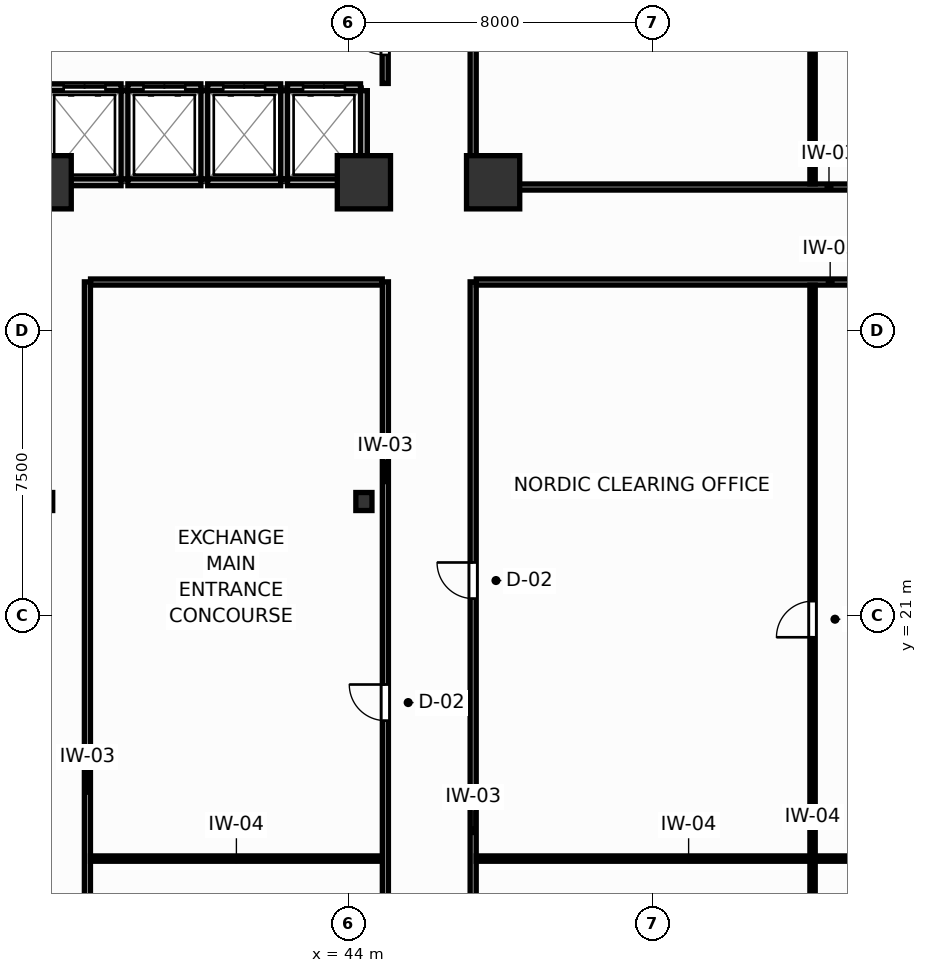
"""IFC4 building model, lengths in metres.
Left out: names, types, materials, properties, quantities, classifications, styles, units other than length and angle.
Written with IfcOpenShell. Run it as: python <this file> out.ifc"""

import sys

from ifc_helpers import new_model, si_unit, direction, frame, frame_2d, origin, origin_2d, place, context, subcontext, project, spatial, rectangle, i_section, extrude, source, transform, mapped, element, fill, save


model = new_model("IFC4")
c1 = context("Model", 3, precision=1e-05, world=origin(), true_north=direction((0.0, 1.0)))
c2 = subcontext(c1, "Body", "Model", "MODEL_VIEW")
j1 = project(units=[si_unit("LENGTHUNIT", "METRE"), si_unit("PLANEANGLEUNIT", "RADIAN")], contexts=[c1])
p1 = place(None, origin())
s1 = spatial("IfcSite", under=j1, at=p1, CompositionType="ELEMENT")
p2 = place(p1, origin())
s2 = spatial("IfcBuilding", under=s1, at=p2, CompositionType="ELEMENT")
p3 = place(p2, origin())
s3 = spatial("IfcBuildingStorey", under=s2, at=p3, CompositionType="ELEMENT", Elevation=0.0)
m1 = source(origin(), c2, "Body", "SweptSolid", [
    extrude(rectangle(XDim=1.4, YDim=1.4, at=origin_2d()), origin(), (0.0, 0.0, 1.0), 4.8),
])
for number, where, z_axis, x_axis in (
    (1, (44.4, 32.4, 0.0), (0.0, 0.0, 1.0), (1.0, 0.0, 0.0)),
    (2, (36.0, 32.4, 0.0), (0.0, 0.0, 1.0), (1.0, 0.0, 0.0)),
    (3, (47.8, 32.4, 0.0), (0.0, 0.0, 1.0), (1.0, 0.0, 0.0)),
):
    element("IfcColumn", number, at=place(p3, frame(where, z_axis=z_axis, x_axis=x_axis)), inside=s3, PredefinedType="COLUMN", context=c2, shape_type="MappedRepresentation", body=[
        mapped(m1, transform((0.0, 0.0, 0.0), scale=1.0)),
    ])
m2 = source(origin(), c2, "Body", "SweptSolid", [
    extrude(i_section(OverallWidth=0.424, OverallDepth=0.474, WebThickness=0.045, FlangeThickness=0.072, FilletRadius=0.015, at=origin_2d()), origin(), (0.0, 0.0, 1.0), 4.8),
])
for number, where, z_axis, x_axis in (
    (4, (44.4, 24.0, 0.0), (0.0, 0.0, 1.0), (1.0, 0.0, 0.0)),
    (5, (36.0, 24.0, 0.0), (0.0, 0.0, 1.0), (1.0, 0.0, 0.0)),
):
    element("IfcColumn", number, at=place(p3, frame(where, z_axis=z_axis, x_axis=x_axis)), inside=s3, PredefinedType="COLUMN", context=c2, shape_type="MappedRepresentation", body=[
        mapped(m2, transform((0.0, 0.0, 0.0), scale=1.0)),
    ])
p4 = place(p3, frame((36.09, 34.9, 0.0), z_axis=(0.0, 0.0, 1.0), x_axis=(1.0, 0.0, 0.0)))
e6 = element("IfcWall", 6, at=p4, inside=s3, PredefinedType="PARTITIONING", context=c2, shape_type="SweptSolid", body=[
    extrude(rectangle(XDim=1.92, YDim=0.18, at=frame_2d((0.96, 0.0))), origin(), (0.0, 0.0, 1.0), 4.52),
])
p5 = place(p4, frame((0.41, 0.0, 0.0)))
e7 = element("IfcOpeningElement", 7, at=p5, cuts=e6, PredefinedType="OPENING", context=c2, shape_type="SweptSolid", body=[
    extrude(rectangle(XDim=1.1, YDim=2.1, at=frame_2d((0.55, 1.05))), frame((0.0, 0.1, 0.0), z_axis=(0.0, -1.0, 0.0), x_axis=(1.0, 0.0, 0.0)), (0.0, 0.0, 1.0), 0.2),
])
p6 = place(p3, frame((36.09, 32.4, 0.0), z_axis=(0.0, 0.0, 1.0), x_axis=(1.0, 0.0, 0.0)))
e8 = element("IfcWall", 8, at=p6, inside=s3, PredefinedType="PARTITIONING", context=c2, shape_type="SweptSolid", body=[
    extrude(rectangle(XDim=1.92, YDim=0.18, at=frame_2d((0.96, 0.0))), origin(), (0.0, 0.0, 1.0), 3.82),
])
p7 = place(p3, frame((38.19, 34.9, 0.0), z_axis=(0.0, 0.0, 1.0), x_axis=(1.0, 0.0, 0.0)))
e9 = element("IfcWall", 9, at=p7, inside=s3, PredefinedType="PARTITIONING", context=c2, shape_type="SweptSolid", body=[
    extrude(rectangle(XDim=1.92, YDim=0.18, at=frame_2d((0.96, 0.0))), origin(), (0.0, 0.0, 1.0), 4.52),
])
p8 = place(p7, frame((0.41, 0.0, 0.0)))
e10 = element("IfcOpeningElement", 10, at=p8, cuts=e9, PredefinedType="OPENING", context=c2, shape_type="SweptSolid", body=[
    extrude(rectangle(XDim=1.1, YDim=2.1, at=frame_2d((0.55, 1.05))), frame((0.0, 0.1, 0.0), z_axis=(0.0, -1.0, 0.0), x_axis=(1.0, 0.0, 0.0)), (0.0, 0.0, 1.0), 0.2),
])
p9 = place(p3, frame((38.19, 32.4, 0.0), z_axis=(0.0, 0.0, 1.0), x_axis=(1.0, 0.0, 0.0)))
e11 = element("IfcWall", 11, at=p9, inside=s3, PredefinedType="PARTITIONING", context=c2, shape_type="SweptSolid", body=[
    extrude(rectangle(XDim=1.92, YDim=0.18, at=frame_2d((0.96, 0.0))), origin(), (0.0, 0.0, 1.0), 3.82),
])
p10 = place(p3, frame((38.1, 32.49, 0.0), z_axis=(0.0, 0.0, 1.0), x_axis=(0.0, 1.0, 0.0)))
e12 = element("IfcWall", 12, at=p10, inside=s3, PredefinedType="PARTITIONING", context=c2, shape_type="SweptSolid", body=[
    extrude(rectangle(XDim=2.32, YDim=0.18, at=frame_2d((1.16, 0.0))), origin(), (0.0, 0.0, 1.0), 4.52),
])
p11 = place(p3, frame((40.29, 34.9, 0.0), z_axis=(0.0, 0.0, 1.0), x_axis=(1.0, 0.0, 0.0)))
e13 = element("IfcWall", 13, at=p11, inside=s3, PredefinedType="PARTITIONING", context=c2, shape_type="SweptSolid", body=[
    extrude(rectangle(XDim=1.92, YDim=0.18, at=frame_2d((0.96, 0.0))), origin(), (0.0, 0.0, 1.0), 4.52),
])
p12 = place(p11, frame((0.41, 0.0, 0.0)))
e14 = element("IfcOpeningElement", 14, at=p12, cuts=e13, PredefinedType="OPENING", context=c2, shape_type="SweptSolid", body=[
    extrude(rectangle(XDim=1.1, YDim=2.1, at=frame_2d((0.55, 1.05))), frame((0.0, 0.1, 0.0), z_axis=(0.0, -1.0, 0.0), x_axis=(1.0, 0.0, 0.0)), (0.0, 0.0, 1.0), 0.2),
])
p13 = place(p3, frame((40.29, 32.4, 0.0), z_axis=(0.0, 0.0, 1.0), x_axis=(1.0, 0.0, 0.0)))
e15 = element("IfcWall", 15, at=p13, inside=s3, PredefinedType="PARTITIONING", context=c2, shape_type="SweptSolid", body=[
    extrude(rectangle(XDim=1.92, YDim=0.18, at=frame_2d((0.96, 0.0))), origin(), (0.0, 0.0, 1.0), 3.82),
])
p14 = place(p3, frame((40.2, 32.49, 0.0), z_axis=(0.0, 0.0, 1.0), x_axis=(0.0, 1.0, 0.0)))
e16 = element("IfcWall", 16, at=p14, inside=s3, PredefinedType="PARTITIONING", context=c2, shape_type="SweptSolid", body=[
    extrude(rectangle(XDim=2.32, YDim=0.18, at=frame_2d((1.16, 0.0))), origin(), (0.0, 0.0, 1.0), 4.52),
])
p15 = place(p3, frame((42.39, 34.9, 0.0), z_axis=(0.0, 0.0, 1.0), x_axis=(1.0, 0.0, 0.0)))
e17 = element("IfcWall", 17, at=p15, inside=s3, PredefinedType="PARTITIONING", context=c2, shape_type="SweptSolid", body=[
    extrude(rectangle(XDim=1.92, YDim=0.18, at=frame_2d((0.96, 0.0))), origin(), (0.0, 0.0, 1.0), 4.52),
])
p16 = place(p15, frame((0.41, 0.0, 0.0)))
e18 = element("IfcOpeningElement", 18, at=p16, cuts=e17, PredefinedType="OPENING", context=c2, shape_type="SweptSolid", body=[
    extrude(rectangle(XDim=1.1, YDim=2.1, at=frame_2d((0.55, 1.05))), frame((0.0, 0.1, 0.0), z_axis=(0.0, -1.0, 0.0), x_axis=(1.0, 0.0, 0.0)), (0.0, 0.0, 1.0), 0.2),
])
p17 = place(p3, frame((42.39, 32.4, 0.0), z_axis=(0.0, 0.0, 1.0), x_axis=(1.0, 0.0, 0.0)))
e19 = element("IfcWall", 19, at=p17, inside=s3, PredefinedType="PARTITIONING", context=c2, shape_type="SweptSolid", body=[
    extrude(rectangle(XDim=1.92, YDim=0.18, at=frame_2d((0.96, 0.0))), origin(), (0.0, 0.0, 1.0), 3.82),
])
for number, where, z_axis, x_axis in (
    (20, (42.3, 32.49, 0.0), (0.0, 0.0, 1.0), (0.0, 1.0, 0.0)),
    (21, (44.4, 32.49, 0.0), (0.0, 0.0, 1.0), (0.0, 1.0, 0.0)),
):
    element("IfcWall", number, at=place(p3, frame(where, z_axis=z_axis, x_axis=x_axis)), inside=s3, PredefinedType="PARTITIONING", context=c2, shape_type="SweptSolid", body=[
        extrude(rectangle(XDim=2.32, YDim=0.18, at=frame_2d((1.16, 0.0))), origin(), (0.0, 0.0, 1.0), 4.52),
    ])
p18 = place(p3, frame((44.96, 35.0, 0.0), z_axis=(0.0, 0.0, 1.0), x_axis=(0.0, 1.0, 0.0)))
e22 = element("IfcWall", 22, at=p18, inside=s3, PredefinedType="PARTITIONING", context=c2, shape_type="SweptSolid", body=[
    extrude(rectangle(XDim=2.65, YDim=0.16, at=frame_2d((1.325, 0.0))), origin(), (0.0, 0.0, 1.0), 4.52),
])
p19 = place(p18, frame((0.75, 0.0, 0.0)))
e23 = element("IfcOpeningElement", 23, at=p19, cuts=e22, PredefinedType="OPENING", context=c2, shape_type="SweptSolid", body=[
    extrude(rectangle(XDim=1.05, YDim=2.1, at=frame_2d((0.525, 1.05))), frame((0.0, 0.09, 0.0), z_axis=(0.0, -1.0, 0.0), x_axis=(1.0, 0.0, 0.0)), (0.0, 0.0, 1.0), 0.18),
])
p20 = place(p3, frame((47.275, 3.02, 0.0), z_axis=(0.0, 0.0, 1.0), x_axis=(0.0, 1.0, 0.0)))
e24 = element("IfcWall", 24, at=p20, inside=s3, PredefinedType="PARTITIONING", context=c2, shape_type="SweptSolid", body=[
    extrude(rectangle(XDim=26.76, YDim=0.16, at=frame_2d((13.38, 0.0))), origin(), (0.0, 0.0, 1.0), 4.52),
])
p21 = place(p20, frame((5.263, 0.0, 0.0)))
e25 = element("IfcOpeningElement", 25, at=p21, cuts=e24, PredefinedType="OPENING", context=c2, shape_type="SweptSolid", body=[
    extrude(rectangle(XDim=0.95, YDim=2.05, at=frame_2d((0.475, 1.025))), frame((0.0, 0.09, 0.0), z_axis=(0.0, -1.0, 0.0), x_axis=(1.0, 0.0, 0.0)), (0.0, 0.0, 1.0), 0.18),
])
p22 = place(p20, frame((18.426, 0.0, 0.0)))
e26 = element("IfcOpeningElement", 26, at=p22, cuts=e24, PredefinedType="OPENING", context=c2, shape_type="SweptSolid", body=[
    extrude(rectangle(XDim=0.95, YDim=2.05, at=frame_2d((0.475, 1.025))), frame((0.0, 0.09, 0.0), z_axis=(0.0, -1.0, 0.0), x_axis=(1.0, 0.0, 0.0)), (0.0, 0.0, 1.0), 0.18),
])
p23 = place(p3, frame((44.965, 3.02, 0.0), z_axis=(0.0, 0.0, 1.0), x_axis=(0.0, 1.0, 0.0)))
e27 = element("IfcWall", 27, at=p23, inside=s3, PredefinedType="PARTITIONING", context=c2, shape_type="SweptSolid", body=[
    extrude(rectangle(XDim=26.76, YDim=0.16, at=frame_2d((13.38, 0.0))), origin(), (0.0, 0.0, 1.0), 4.52),
])
p24 = place(p23, frame((8.486, 0.0, 0.0)))
e28 = element("IfcOpeningElement", 28, at=p24, cuts=e27, PredefinedType="OPENING", context=c2, shape_type="SweptSolid", body=[
    extrude(rectangle(XDim=0.95, YDim=2.05, at=frame_2d((0.475, 1.025))), frame((0.0, 0.09, 0.0), z_axis=(0.0, -1.0, 0.0), x_axis=(1.0, 0.0, 0.0)), (0.0, 0.0, 1.0), 0.18),
])
p25 = place(p23, frame((15.215, 0.0, 0.0)))
e29 = element("IfcOpeningElement", 29, at=p25, cuts=e27, PredefinedType="OPENING", context=c2, shape_type="SweptSolid", body=[
    extrude(rectangle(XDim=0.95, YDim=2.05, at=frame_2d((0.475, 1.025))), frame((0.0, 0.09, 0.0), z_axis=(0.0, -1.0, 0.0), x_axis=(1.0, 0.0, 0.0)), (0.0, 0.0, 1.0), 0.18),
])
p26 = place(p3, frame((37.125, 3.02, 0.0), z_axis=(0.0, 0.0, 1.0), x_axis=(0.0, 1.0, 0.0)))
e30 = element("IfcWall", 30, at=p26, inside=s3, PredefinedType="PARTITIONING", context=c2, shape_type="SweptSolid", body=[
    extrude(rectangle(XDim=26.76, YDim=0.16, at=frame_2d((13.38, 0.0))), origin(), (0.0, 0.0, 1.0), 4.52),
])
p27 = place(p3, frame((47.275, 32.27, 0.0), z_axis=(0.0, 0.0, 1.0), x_axis=(0.0, 1.0, 0.0)))
e31 = element("IfcWall", 31, at=p27, inside=s3, PredefinedType="PARTITIONING", context=c2, shape_type="SweptSolid", body=[
    extrude(rectangle(XDim=26.71, YDim=0.16, at=frame_2d((13.355, 0.0))), origin(), (0.0, 0.0, 1.0), 4.52),
])
p28 = place(p27, frame((7.145, 0.0, 0.0)))
e32 = element("IfcOpeningElement", 32, at=p28, cuts=e31, PredefinedType="OPENING", context=c2, shape_type="SweptSolid", body=[
    extrude(rectangle(XDim=0.95, YDim=2.05, at=frame_2d((0.475, 1.025))), frame((0.0, 0.09, 0.0), z_axis=(0.0, -1.0, 0.0), x_axis=(1.0, 0.0, 0.0)), (0.0, 0.0, 1.0), 0.18),
])
p29 = place(p27, frame((20.283, 0.0, 0.0)))
e33 = element("IfcOpeningElement", 33, at=p29, cuts=e31, PredefinedType="OPENING", context=c2, shape_type="SweptSolid", body=[
    extrude(rectangle(XDim=0.95, YDim=2.05, at=frame_2d((0.475, 1.025))), frame((0.0, 0.09, 0.0), z_axis=(0.0, -1.0, 0.0), x_axis=(1.0, 0.0, 0.0)), (0.0, 0.0, 1.0), 0.18),
])
p30 = place(p3, frame((47.357, 29.775, 0.0), z_axis=(0.0, 0.0, 1.0), x_axis=(1.0, 0.0, 0.0)))
e34 = element("IfcWall", 34, at=p30, inside=s3, PredefinedType="PARTITIONING", context=c2, shape_type="SweptSolid", body=[
    extrude(rectangle(XDim=18.623, YDim=0.16, at=frame_2d((9.312, 0.0))), origin(), (0.0, 0.0, 1.0), 4.52),
])
p31 = place(p3, frame((47.357, 32.275, 0.0), z_axis=(0.0, 0.0, 1.0), x_axis=(1.0, 0.0, 0.0)))
e35 = element("IfcWall", 35, at=p31, inside=s3, PredefinedType="PARTITIONING", context=c2, shape_type="SweptSolid", body=[
    extrude(rectangle(XDim=18.561, YDim=0.16, at=frame_2d((9.281, 0.0))), origin(), (0.0, 0.0, 1.0), 3.82),
])
p32 = place(p3, frame((37.207, 29.775, 0.0), z_axis=(0.0, 0.0, 1.0), x_axis=(1.0, 0.0, 0.0)))
e36 = element("IfcWall", 36, at=p32, inside=s3, PredefinedType="PARTITIONING", context=c2, shape_type="SweptSolid", body=[
    extrude(rectangle(XDim=7.676, YDim=0.16, at=frame_2d((3.838, 0.0))), origin(), (0.0, 0.0, 1.0), 4.52),
])
p33 = place(p3, frame((56.205, 3.02, 0.0), z_axis=(0.0, 0.0, 1.0), x_axis=(0.0, 1.0, 0.0)))
e37 = element("IfcWall", 37, at=p33, inside=s3, PredefinedType="PARTITIONING", context=c2, shape_type="SweptSolid", body=[
    extrude(rectangle(XDim=26.673, YDim=0.14, at=frame_2d((13.336, 0.0))), origin(), (0.0, 0.0, 1.0), 4.52),
])
p34 = place(p33, frame((5.263, 0.0, 0.0)))
e38 = element("IfcOpeningElement", 38, at=p34, cuts=e37, PredefinedType="OPENING", context=c2, shape_type="SweptSolid", body=[
    extrude(rectangle(XDim=0.95, YDim=2.05, at=frame_2d((0.475, 1.025))), frame((0.0, 0.08, 0.0), z_axis=(0.0, -1.0, 0.0), x_axis=(1.0, 0.0, 0.0)), (0.0, 0.0, 1.0), 0.16),
])
p35 = place(p33, frame((17.408, 0.0, 0.0)))
e39 = element("IfcOpeningElement", 39, at=p35, cuts=e37, PredefinedType="OPENING", context=c2, shape_type="SweptSolid", body=[
    extrude(rectangle(XDim=0.95, YDim=2.05, at=frame_2d((0.475, 1.025))), frame((0.0, 0.08, 0.0), z_axis=(0.0, -1.0, 0.0), x_axis=(1.0, 0.0, 0.0)), (0.0, 0.0, 1.0), 0.16),
])
p36 = place(p3, frame((56.205, 32.357, 0.0), z_axis=(0.0, 0.0, 1.0), x_axis=(0.0, 1.0, 0.0)))
e40 = element("IfcWall", 40, at=p36, inside=s3, PredefinedType="PARTITIONING", context=c2, shape_type="SweptSolid", body=[
    extrude(rectangle(XDim=26.623, YDim=0.14, at=frame_2d((13.312, 0.0))), origin(), (0.0, 0.0, 1.0), 4.52),
])
p37 = place(p36, frame((3.98, 0.0, 0.0)))
e41 = element("IfcOpeningElement", 41, at=p37, cuts=e40, PredefinedType="OPENING", context=c2, shape_type="SweptSolid", body=[
    extrude(rectangle(XDim=0.95, YDim=2.05, at=frame_2d((0.475, 1.025))), frame((0.0, 0.08, 0.0), z_axis=(0.0, -1.0, 0.0), x_axis=(1.0, 0.0, 0.0)), (0.0, 0.0, 1.0), 0.16),
])
p38 = place(p36, frame((21.27, 0.0, 0.0)))
e42 = element("IfcOpeningElement", 42, at=p38, cuts=e40, PredefinedType="OPENING", context=c2, shape_type="SweptSolid", body=[
    extrude(rectangle(XDim=0.95, YDim=2.05, at=frame_2d((0.475, 1.025))), frame((0.0, 0.08, 0.0), z_axis=(0.0, -1.0, 0.0), x_axis=(1.0, 0.0, 0.0)), (0.0, 0.0, 1.0), 0.16),
])
p39 = place(p3, frame((47.357, 14.605, 0.0), z_axis=(0.0, 0.0, 1.0), x_axis=(1.0, 0.0, 0.0)))
e43 = element("IfcWall", 43, at=p39, inside=s3, PredefinedType="PARTITIONING", context=c2, shape_type="SweptSolid", body=[
    extrude(rectangle(XDim=18.623, YDim=0.14, at=frame_2d((9.312, 0.0))), origin(), (0.0, 0.0, 1.0), 4.52),
])
p40 = place(p3, frame((37.207, 14.605, 0.0), z_axis=(0.0, 0.0, 1.0), x_axis=(1.0, 0.0, 0.0)))
e44 = element("IfcWall", 44, at=p40, inside=s3, PredefinedType="PARTITIONING", context=c2, shape_type="SweptSolid", body=[
    extrude(rectangle(XDim=7.676, YDim=0.14, at=frame_2d((3.838, 0.0))), origin(), (0.0, 0.0, 1.0), 4.52),
])
p41 = place(p5, origin())
e45 = element("IfcDoor", 45, at=p41, inside=s3, OperationType="DOUBLE_DOOR_SLIDING", PredefinedType="DOOR", context=c2, shape_type="SweptSolid", body=[
    extrude(rectangle(XDim=1.1, YDim=2.1, at=frame_2d((0.55, 1.05))), frame((0.0, 0.025, 0.0), z_axis=(0.0, -1.0, 0.0), x_axis=(1.0, 0.0, 0.0)), (0.0, 0.0, 1.0), 0.05),
])
fill(e7, e45)
p42 = place(p8, origin())
e46 = element("IfcDoor", 46, at=p42, inside=s3, OperationType="DOUBLE_DOOR_SLIDING", PredefinedType="DOOR", context=c2, shape_type="SweptSolid", body=[
    extrude(rectangle(XDim=1.1, YDim=2.1, at=frame_2d((0.55, 1.05))), frame((0.0, 0.025, 0.0), z_axis=(0.0, -1.0, 0.0), x_axis=(1.0, 0.0, 0.0)), (0.0, 0.0, 1.0), 0.05),
])
fill(e10, e46)
p43 = place(p12, origin())
e47 = element("IfcDoor", 47, at=p43, inside=s3, OperationType="DOUBLE_DOOR_SLIDING", PredefinedType="DOOR", context=c2, shape_type="SweptSolid", body=[
    extrude(rectangle(XDim=1.1, YDim=2.1, at=frame_2d((0.55, 1.05))), frame((0.0, 0.025, 0.0), z_axis=(0.0, -1.0, 0.0), x_axis=(1.0, 0.0, 0.0)), (0.0, 0.0, 1.0), 0.05),
])
fill(e14, e47)
p44 = place(p16, origin())
e48 = element("IfcDoor", 48, at=p44, inside=s3, OperationType="DOUBLE_DOOR_SLIDING", PredefinedType="DOOR", context=c2, shape_type="SweptSolid", body=[
    extrude(rectangle(XDim=1.1, YDim=2.1, at=frame_2d((0.55, 1.05))), frame((0.0, 0.025, 0.0), z_axis=(0.0, -1.0, 0.0), x_axis=(1.0, 0.0, 0.0)), (0.0, 0.0, 1.0), 0.05),
])
fill(e18, e48)
p45 = place(p19, origin())
e49 = element("IfcDoor", 49, at=p45, inside=s3, OperationType="SINGLE_SWING_RIGHT", PredefinedType="DOOR", context=c2, shape_type="SweptSolid", body=[
    extrude(rectangle(XDim=1.05, YDim=2.1, at=frame_2d((0.525, 1.05))), frame((0.0, 0.025, 0.0), z_axis=(0.0, -1.0, 0.0), x_axis=(1.0, 0.0, 0.0)), (0.0, 0.0, 1.0), 0.05),
])
fill(e23, e49)
p46 = place(p22, origin())
e50 = element("IfcDoor", 50, at=p46, inside=s3, OperationType="SINGLE_SWING_RIGHT", PredefinedType="DOOR", context=c2, shape_type="SweptSolid", body=[
    extrude(rectangle(XDim=0.95, YDim=2.05, at=frame_2d((0.475, 1.025))), frame((0.0, 0.025, 0.0), z_axis=(0.0, -1.0, 0.0), x_axis=(1.0, 0.0, 0.0)), (0.0, 0.0, 1.0), 0.05),
])
fill(e26, e50)
p47 = place(p25, origin())
e51 = element("IfcDoor", 51, at=p47, inside=s3, OperationType="SINGLE_SWING_RIGHT", PredefinedType="DOOR", context=c2, shape_type="SweptSolid", body=[
    extrude(rectangle(XDim=0.95, YDim=2.05, at=frame_2d((0.475, 1.025))), frame((0.0, 0.025, 0.0), z_axis=(0.0, -1.0, 0.0), x_axis=(1.0, 0.0, 0.0)), (0.0, 0.0, 1.0), 0.05),
])
fill(e29, e51)
p48 = place(p35, origin())
e52 = element("IfcDoor", 52, at=p48, inside=s3, OperationType="SINGLE_SWING_LEFT", PredefinedType="DOOR", context=c2, shape_type="SweptSolid", body=[
    extrude(rectangle(XDim=0.95, YDim=2.05, at=frame_2d((0.475, 1.025))), frame((0.0, 0.025, 0.0), z_axis=(0.0, -1.0, 0.0), x_axis=(1.0, 0.0, 0.0)), (0.0, 0.0, 1.0), 0.05),
])
fill(e39, e52)
save(model, sys.argv[1])
